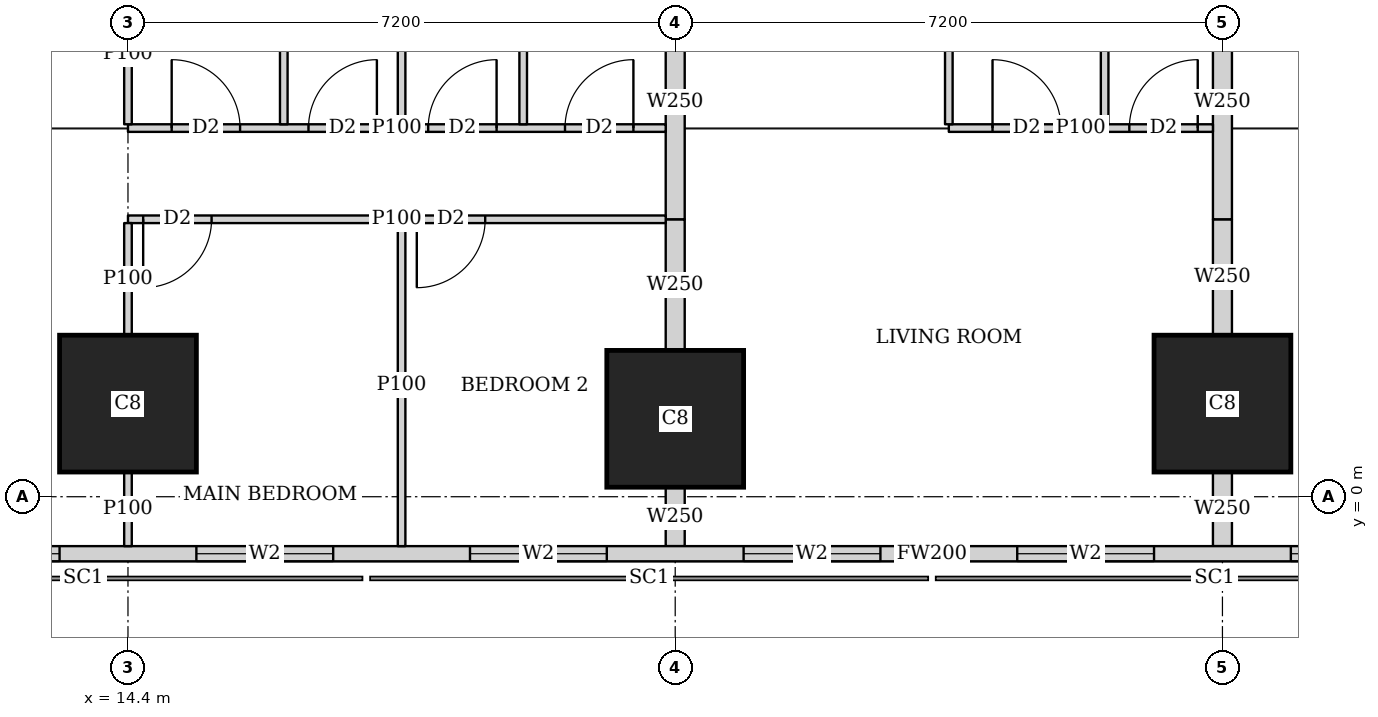
"""IFC4 building model, lengths in metres.
Left out: names, types, materials, properties, quantities, classifications, styles, units other than length and angle.
Written with IfcOpenShell. Run it as: python <this file> out.ifc"""

import sys

from ifc_helpers import new_model, si_unit, direction, frame, frame_2d, origin, origin_2d, place, context, subcontext, project, spatial, rectangle, extrude, element, fill, save


model = new_model("IFC4")
c1 = context("Model", 3, precision=1e-05, world=origin(), true_north=direction((0.0, 1.0)))
c2 = subcontext(c1, "Body", "Model", "MODEL_VIEW")
j1 = project(units=[si_unit("LENGTHUNIT", "METRE"), si_unit("PLANEANGLEUNIT", "RADIAN")], contexts=[c1])
p1 = place(None, origin())
s1 = spatial("IfcSite", under=j1, at=p1, CompositionType="ELEMENT")
p2 = place(p1, origin())
s2 = spatial("IfcBuilding", under=s1, at=p2, CompositionType="ELEMENT")
p3 = place(p2, frame((0.0, 0.0, 180.8)))
s3 = spatial("IfcBuildingStorey", under=s2, at=p3, CompositionType="ELEMENT", Elevation=180.8)
for number, where, z_axis, x_axis in (
    (1, (14.4, 1.225, 0.0), (0.0, 0.0, 1.0), (1.0, 0.0, 0.0)),
    (2, (21.6, 1.025, 0.0), (0.0, 0.0, 1.0), (1.0, 0.0, 0.0)),
    (3, (28.8, 1.225, 0.0), (0.0, 0.0, 1.0), (1.0, 0.0, 0.0)),
):
    element("IfcColumn", number, at=place(p3, frame(where, z_axis=z_axis, x_axis=x_axis)), inside=s3, PredefinedType="COLUMN", context=c2, shape_type="SweptSolid", body=[
        extrude(rectangle(XDim=1.8, YDim=1.8, at=origin_2d()), origin(), (0.0, 0.0, 1.0), 3.75),
    ])
p4 = place(p3, frame((2.163, -0.75, 0.0), z_axis=(0.0, 0.0, 1.0), x_axis=(1.0, 0.0, 0.0)))
e4 = element("IfcWall", 4, at=p4, inside=s3, PredefinedType="SOLIDWALL", context=c2, shape_type="SweptSolid", body=[
    extrude(rectangle(XDim=45.628, YDim=0.2, at=frame_2d((22.814, 0.0))), origin(), (0.0, 0.0, 1.0), 3.5),
])
p5 = place(p4, frame((9.537, 0.0, 0.9)))
e5 = element("IfcOpeningElement", 5, at=p5, cuts=e4, PredefinedType="OPENING", context=c2, shape_type="SweptSolid", body=[
    extrude(rectangle(XDim=1.8, YDim=1.5, at=frame_2d((0.9, 0.75))), frame((0.0, 0.11, 0.0), z_axis=(0.0, -1.0, 0.0), x_axis=(1.0, 0.0, 0.0)), (0.0, 0.0, 1.0), 0.22),
])
p6 = place(p4, frame((13.137, 0.0, 0.9)))
e6 = element("IfcOpeningElement", 6, at=p6, cuts=e4, PredefinedType="OPENING", context=c2, shape_type="SweptSolid", body=[
    extrude(rectangle(XDim=1.8, YDim=1.5, at=frame_2d((0.9, 0.75))), frame((0.0, 0.11, 0.0), z_axis=(0.0, -1.0, 0.0), x_axis=(1.0, 0.0, 0.0)), (0.0, 0.0, 1.0), 0.22),
])
p7 = place(p4, frame((16.737, 0.0, 0.9)))
e7 = element("IfcOpeningElement", 7, at=p7, cuts=e4, PredefinedType="OPENING", context=c2, shape_type="SweptSolid", body=[
    extrude(rectangle(XDim=1.8, YDim=1.5, at=frame_2d((0.9, 0.75))), frame((0.0, 0.11, 0.0), z_axis=(0.0, -1.0, 0.0), x_axis=(1.0, 0.0, 0.0)), (0.0, 0.0, 1.0), 0.22),
])
p8 = place(p4, frame((20.337, 0.0, 0.9)))
e8 = element("IfcOpeningElement", 8, at=p8, cuts=e4, PredefinedType="OPENING", context=c2, shape_type="SweptSolid", body=[
    extrude(rectangle(XDim=1.8, YDim=1.5, at=frame_2d((0.9, 0.75))), frame((0.0, 0.11, 0.0), z_axis=(0.0, -1.0, 0.0), x_axis=(1.0, 0.0, 0.0)), (0.0, 0.0, 1.0), 0.22),
])
p9 = place(p4, frame((23.937, 0.0, 0.9)))
e9 = element("IfcOpeningElement", 9, at=p9, cuts=e4, PredefinedType="OPENING", context=c2, shape_type="SweptSolid", body=[
    extrude(rectangle(XDim=1.8, YDim=1.5, at=frame_2d((0.9, 0.75))), frame((0.0, 0.11, 0.0), z_axis=(0.0, -1.0, 0.0), x_axis=(1.0, 0.0, 0.0)), (0.0, 0.0, 1.0), 0.22),
])
p10 = place(p4, frame((27.537, 0.0, 0.9)))
e10 = element("IfcOpeningElement", 10, at=p10, cuts=e4, PredefinedType="OPENING", context=c2, shape_type="SweptSolid", body=[
    extrude(rectangle(XDim=1.8, YDim=1.5, at=frame_2d((0.9, 0.75))), frame((0.0, 0.11, 0.0), z_axis=(0.0, -1.0, 0.0), x_axis=(1.0, 0.0, 0.0)), (0.0, 0.0, 1.0), 0.22),
])
p11 = place(p4, frame((31.137, 0.0, 0.9)))
e11 = element("IfcOpeningElement", 11, at=p11, cuts=e4, PredefinedType="OPENING", context=c2, shape_type="SweptSolid", body=[
    extrude(rectangle(XDim=1.8, YDim=1.5, at=frame_2d((0.9, 0.75))), frame((0.0, 0.11, 0.0), z_axis=(0.0, -1.0, 0.0), x_axis=(1.0, 0.0, 0.0)), (0.0, 0.0, 1.0), 0.22),
])
p12 = place(p4, frame((34.737, 0.0, 0.9)))
e12 = element("IfcOpeningElement", 12, at=p12, cuts=e4, PredefinedType="OPENING", context=c2, shape_type="SweptSolid", body=[
    extrude(rectangle(XDim=1.8, YDim=1.5, at=frame_2d((0.9, 0.75))), frame((0.0, 0.11, 0.0), z_axis=(0.0, -1.0, 0.0), x_axis=(1.0, 0.0, 0.0)), (0.0, 0.0, 1.0), 0.22),
])
p13 = place(p3, frame((21.475, 3.65, 0.0), z_axis=(0.0, 0.0, 1.0), x_axis=(-1.0, 0.0, 0.0)))
e13 = element("IfcWall", 13, at=p13, inside=s3, PredefinedType="PARTITIONING", context=c2, shape_type="SweptSolid", body=[
    extrude(rectangle(XDim=7.075, YDim=0.1, at=frame_2d((3.538, 0.0))), origin(), (0.0, 0.0, 1.0), 3.5),
])
p14 = place(p13, frame((5.975, 0.0, 0.0)))
e14 = element("IfcOpeningElement", 14, at=p14, cuts=e13, PredefinedType="OPENING", context=c2, shape_type="SweptSolid", body=[
    extrude(rectangle(XDim=0.9, YDim=2.1, at=frame_2d((0.45, 1.05))), frame((0.0, 0.06, 0.0), z_axis=(0.0, -1.0, 0.0), x_axis=(1.0, 0.0, 0.0)), (0.0, 0.0, 1.0), 0.12),
])
p15 = place(p13, frame((2.375, 0.0, 0.0)))
e15 = element("IfcOpeningElement", 15, at=p15, cuts=e13, PredefinedType="OPENING", context=c2, shape_type="SweptSolid", body=[
    extrude(rectangle(XDim=0.9, YDim=2.1, at=frame_2d((0.45, 1.05))), frame((0.0, 0.06, 0.0), z_axis=(0.0, -1.0, 0.0), x_axis=(1.0, 0.0, 0.0)), (0.0, 0.0, 1.0), 0.12),
])
p16 = place(p3, frame((21.475, 4.85, 0.0), z_axis=(0.0, 0.0, 1.0), x_axis=(-1.0, 0.0, 0.0)))
e16 = element("IfcWall", 16, at=p16, inside=s3, PredefinedType="PARTITIONING", context=c2, shape_type="SweptSolid", body=[
    extrude(rectangle(XDim=7.075, YDim=0.1, at=frame_2d((3.538, 0.0))), origin(), (0.0, 0.0, 1.0), 3.5),
])
p17 = place(p16, frame((5.6, 0.0, 0.0)))
e17 = element("IfcOpeningElement", 17, at=p17, cuts=e16, PredefinedType="OPENING", context=c2, shape_type="SweptSolid", body=[
    extrude(rectangle(XDim=0.9, YDim=2.1, at=frame_2d((0.45, 1.05))), frame((0.0, 0.06, 0.0), z_axis=(0.0, -1.0, 0.0), x_axis=(1.0, 0.0, 0.0)), (0.0, 0.0, 1.0), 0.12),
])
p18 = place(p16, frame((2.225, 0.0, 0.0)))
e18 = element("IfcOpeningElement", 18, at=p18, cuts=e16, PredefinedType="OPENING", context=c2, shape_type="SweptSolid", body=[
    extrude(rectangle(XDim=0.9, YDim=2.1, at=frame_2d((0.45, 1.05))), frame((0.0, 0.06, 0.0), z_axis=(0.0, -1.0, 0.0), x_axis=(1.0, 0.0, 0.0)), (0.0, 0.0, 1.0), 0.12),
])
p19 = place(p16, frame((3.8, 0.0, 0.0)))
e19 = element("IfcOpeningElement", 19, at=p19, cuts=e16, PredefinedType="OPENING", context=c2, shape_type="SweptSolid", body=[
    extrude(rectangle(XDim=0.9, YDim=2.1, at=frame_2d((0.45, 1.05))), frame((0.0, 0.06, 0.0), z_axis=(0.0, -1.0, 0.0), x_axis=(1.0, 0.0, 0.0)), (0.0, 0.0, 1.0), 0.12),
])
p20 = place(p16, frame((0.425, 0.0, 0.0)))
e20 = element("IfcOpeningElement", 20, at=p20, cuts=e16, PredefinedType="OPENING", context=c2, shape_type="SweptSolid", body=[
    extrude(rectangle(XDim=0.9, YDim=2.1, at=frame_2d((0.45, 1.05))), frame((0.0, 0.06, 0.0), z_axis=(0.0, -1.0, 0.0), x_axis=(1.0, 0.0, 0.0)), (0.0, 0.0, 1.0), 0.12),
])
p21 = place(p3, frame((14.4, -0.65, 0.0), z_axis=(0.0, 0.0, 1.0), x_axis=(0.0, 1.0, 0.0)))
e21 = element("IfcWall", 21, at=p21, inside=s3, PredefinedType="PARTITIONING", context=c2, shape_type="SweptSolid", body=[
    extrude(rectangle(XDim=0.974, YDim=0.1, at=frame_2d((0.487, 0.0))), origin(), (0.0, 0.0, 1.0), 3.5),
])
p22 = place(p3, frame((14.4, 2.126, 0.0), z_axis=(0.0, 0.0, 1.0), x_axis=(0.0, 1.0, 0.0)))
e22 = element("IfcWall", 22, at=p22, inside=s3, PredefinedType="PARTITIONING", context=c2, shape_type="SweptSolid", body=[
    extrude(rectangle(XDim=1.474, YDim=0.1, at=frame_2d((0.737, 0.0))), origin(), (0.0, 0.0, 1.0), 3.5),
])
p23 = place(p3, frame((18.0, -0.65, 0.0), z_axis=(0.0, 0.0, 1.0), x_axis=(0.0, 1.0, 0.0)))
e23 = element("IfcWall", 23, at=p23, inside=s3, PredefinedType="PARTITIONING", context=c2, shape_type="SweptSolid", body=[
    extrude(rectangle(XDim=4.25, YDim=0.1, at=frame_2d((2.125, 0.0))), origin(), (0.0, 0.0, 1.0), 2.1),
])
p24 = place(p3, frame((14.4, 4.9, 0.0), z_axis=(0.0, 0.0, 1.0), x_axis=(0.0, 1.0, 0.0)))
e24 = element("IfcWall", 24, at=p24, inside=s3, PredefinedType="PARTITIONING", context=c2, shape_type="SweptSolid", body=[
    extrude(rectangle(XDim=1.849, YDim=0.1, at=frame_2d((0.925, 0.0))), origin(), (0.0, 0.0, 1.0), 3.5),
])
for number, where, z_axis, x_axis in (
    (25, (18.0, 4.9, 0.0), (0.0, 0.0, 1.0), (0.0, 1.0, 0.0)),
    (26, (16.45, 4.9, 0.0), (0.0, 0.0, 1.0), (0.0, 1.0, 0.0)),
    (27, (19.6, 4.9, 0.0), (0.0, 0.0, 1.0), (0.0, 1.0, 0.0)),
):
    element("IfcWall", number, at=place(p3, frame(where, z_axis=z_axis, x_axis=x_axis)), inside=s3, PredefinedType="PARTITIONING", context=c2, shape_type="SweptSolid", body=[
        extrude(rectangle(XDim=3.525, YDim=0.1, at=frame_2d((1.763, 0.0))), origin(), (0.0, 0.0, 1.0), 3.5),
    ])
p25 = place(p3, frame((28.675, 4.85, 0.0), z_axis=(0.0, 0.0, 1.0), x_axis=(-1.0, 0.0, 0.0)))
e28 = element("IfcWall", 28, at=p25, inside=s3, PredefinedType="PARTITIONING", context=c2, shape_type="SweptSolid", body=[
    extrude(rectangle(XDim=3.475, YDim=0.1, at=frame_2d((1.738, 0.0))), origin(), (0.0, 0.0, 1.0), 3.5),
])
p26 = place(p25, frame((2.0, 0.0, 0.0)))
e29 = element("IfcOpeningElement", 29, at=p26, cuts=e28, PredefinedType="OPENING", context=c2, shape_type="SweptSolid", body=[
    extrude(rectangle(XDim=0.9, YDim=2.1, at=frame_2d((0.45, 1.05))), frame((0.0, 0.06, 0.0), z_axis=(0.0, -1.0, 0.0), x_axis=(1.0, 0.0, 0.0)), (0.0, 0.0, 1.0), 0.12),
])
p27 = place(p25, frame((0.2, 0.0, 0.0)))
e30 = element("IfcOpeningElement", 30, at=p27, cuts=e28, PredefinedType="OPENING", context=c2, shape_type="SweptSolid", body=[
    extrude(rectangle(XDim=0.9, YDim=2.1, at=frame_2d((0.45, 1.05))), frame((0.0, 0.06, 0.0), z_axis=(0.0, -1.0, 0.0), x_axis=(1.0, 0.0, 0.0)), (0.0, 0.0, 1.0), 0.12),
])
for number, where, z_axis, x_axis in (
    (31, (25.2, 4.9, 0.0), (0.0, 0.0, 1.0), (0.0, 1.0, 0.0)),
    (32, (27.25, 4.9, 0.0), (0.0, 0.0, 1.0), (0.0, 1.0, 0.0)),
):
    element("IfcWall", number, at=place(p3, frame(where, z_axis=z_axis, x_axis=x_axis)), inside=s3, PredefinedType="PARTITIONING", context=c2, shape_type="SweptSolid", body=[
        extrude(rectangle(XDim=3.525, YDim=0.1, at=frame_2d((1.763, 0.0))), origin(), (0.0, 0.0, 1.0), 3.5),
    ])
p28 = place(p3, frame((21.6, -0.65, 0.0), z_axis=(0.0, 0.0, 1.0), x_axis=(0.0, 1.0, 0.0)))
e33 = element("IfcWall", 33, at=p28, inside=s3, PredefinedType="SOLIDWALL", context=c2, shape_type="SweptSolid", body=[
    extrude(rectangle(XDim=0.774, YDim=0.25, at=frame_2d((0.387, 0.0))), origin(), (0.0, 0.0, 1.0), 2.1),
])
p29 = place(p3, frame((21.6, 1.926, 0.0), z_axis=(0.0, 0.0, 1.0), x_axis=(0.0, 1.0, 0.0)))
e34 = element("IfcWall", 34, at=p29, inside=s3, PredefinedType="SOLIDWALL", context=c2, shape_type="SweptSolid", body=[
    extrude(rectangle(XDim=1.724, YDim=0.25, at=frame_2d((0.862, 0.0))), origin(), (0.0, 0.0, 1.0), 2.1),
])
p30 = place(p3, frame((21.6, 3.65, 0.0), z_axis=(0.0, 0.0, 1.0), x_axis=(0.0, 1.0, 0.0)))
e35 = element("IfcWall", 35, at=p30, inside=s3, PredefinedType="SOLIDWALL", context=c2, shape_type="SweptSolid", body=[
    extrude(rectangle(XDim=3.099, YDim=0.25, at=frame_2d((1.55, 0.0))), origin(), (0.0, 0.0, 1.0), 3.5),
])
p31 = place(p3, frame((28.8, -0.65, 0.0), z_axis=(0.0, 0.0, 1.0), x_axis=(0.0, 1.0, 0.0)))
e36 = element("IfcWall", 36, at=p31, inside=s3, PredefinedType="SOLIDWALL", context=c2, shape_type="SweptSolid", body=[
    extrude(rectangle(XDim=0.974, YDim=0.25, at=frame_2d((0.487, 0.0))), origin(), (0.0, 0.0, 1.0), 2.1),
])
p32 = place(p3, frame((28.8, 2.126, 0.0), z_axis=(0.0, 0.0, 1.0), x_axis=(0.0, 1.0, 0.0)))
e37 = element("IfcWall", 37, at=p32, inside=s3, PredefinedType="SOLIDWALL", context=c2, shape_type="SweptSolid", body=[
    extrude(rectangle(XDim=1.524, YDim=0.25, at=frame_2d((0.762, 0.0))), origin(), (0.0, 0.0, 1.0), 2.1),
])
p33 = place(p3, frame((28.8, 3.65, 0.0), z_axis=(0.0, 0.0, 1.0), x_axis=(0.0, 1.0, 0.0)))
e38 = element("IfcWall", 38, at=p33, inside=s3, PredefinedType="SOLIDWALL", context=c2, shape_type="SweptSolid", body=[
    extrude(rectangle(XDim=3.099, YDim=0.25, at=frame_2d((1.55, 0.0))), origin(), (0.0, 0.0, 1.0), 3.5),
])
p34 = place(p5, origin())
e39 = element("IfcWindow", 39, at=p34, inside=s3, PartitioningType="SINGLE_PANEL", PredefinedType="WINDOW", context=c2, shape_type="SweptSolid", body=[
    extrude(rectangle(XDim=1.8, YDim=1.5, at=frame_2d((0.9, 0.75))), frame((0.0, 0.03, 0.0), z_axis=(0.0, -1.0, 0.0), x_axis=(1.0, 0.0, 0.0)), (0.0, 0.0, 1.0), 0.06),
])
fill(e5, e39)
p35 = place(p6, origin())
e40 = element("IfcWindow", 40, at=p35, inside=s3, PartitioningType="SINGLE_PANEL", PredefinedType="WINDOW", context=c2, shape_type="SweptSolid", body=[
    extrude(rectangle(XDim=1.8, YDim=1.5, at=frame_2d((0.9, 0.75))), frame((0.0, 0.03, 0.0), z_axis=(0.0, -1.0, 0.0), x_axis=(1.0, 0.0, 0.0)), (0.0, 0.0, 1.0), 0.06),
])
fill(e6, e40)
p36 = place(p7, origin())
e41 = element("IfcWindow", 41, at=p36, inside=s3, PartitioningType="SINGLE_PANEL", PredefinedType="WINDOW", context=c2, shape_type="SweptSolid", body=[
    extrude(rectangle(XDim=1.8, YDim=1.5, at=frame_2d((0.9, 0.75))), frame((0.0, 0.03, 0.0), z_axis=(0.0, -1.0, 0.0), x_axis=(1.0, 0.0, 0.0)), (0.0, 0.0, 1.0), 0.06),
])
fill(e7, e41)
p37 = place(p8, origin())
e42 = element("IfcWindow", 42, at=p37, inside=s3, PartitioningType="SINGLE_PANEL", PredefinedType="WINDOW", context=c2, shape_type="SweptSolid", body=[
    extrude(rectangle(XDim=1.8, YDim=1.5, at=frame_2d((0.9, 0.75))), frame((0.0, 0.03, 0.0), z_axis=(0.0, -1.0, 0.0), x_axis=(1.0, 0.0, 0.0)), (0.0, 0.0, 1.0), 0.06),
])
fill(e8, e42)
p38 = place(p9, origin())
e43 = element("IfcWindow", 43, at=p38, inside=s3, PartitioningType="SINGLE_PANEL", PredefinedType="WINDOW", context=c2, shape_type="SweptSolid", body=[
    extrude(rectangle(XDim=1.8, YDim=1.5, at=frame_2d((0.9, 0.75))), frame((0.0, 0.03, 0.0), z_axis=(0.0, -1.0, 0.0), x_axis=(1.0, 0.0, 0.0)), (0.0, 0.0, 1.0), 0.06),
])
fill(e9, e43)
p39 = place(p10, origin())
e44 = element("IfcWindow", 44, at=p39, inside=s3, PartitioningType="SINGLE_PANEL", PredefinedType="WINDOW", context=c2, shape_type="SweptSolid", body=[
    extrude(rectangle(XDim=1.8, YDim=1.5, at=frame_2d((0.9, 0.75))), frame((0.0, 0.03, 0.0), z_axis=(0.0, -1.0, 0.0), x_axis=(1.0, 0.0, 0.0)), (0.0, 0.0, 1.0), 0.06),
])
fill(e10, e44)
p40 = place(p14, origin())
e45 = element("IfcDoor", 45, at=p40, inside=s3, OperationType="SINGLE_SWING_RIGHT", PredefinedType="DOOR", context=c2, shape_type="SweptSolid", body=[
    extrude(rectangle(XDim=0.9, YDim=2.1, at=frame_2d((0.45, 1.05))), frame((0.0, 0.025, 0.0), z_axis=(0.0, -1.0, 0.0), x_axis=(1.0, 0.0, 0.0)), (0.0, 0.0, 1.0), 0.05),
])
fill(e14, e45)
p41 = place(p15, origin())
e46 = element("IfcDoor", 46, at=p41, inside=s3, OperationType="SINGLE_SWING_RIGHT", PredefinedType="DOOR", context=c2, shape_type="SweptSolid", body=[
    extrude(rectangle(XDim=0.9, YDim=2.1, at=frame_2d((0.45, 1.05))), frame((0.0, 0.025, 0.0), z_axis=(0.0, -1.0, 0.0), x_axis=(1.0, 0.0, 0.0)), (0.0, 0.0, 1.0), 0.05),
])
fill(e15, e46)
p42 = place(p17, origin())
e47 = element("IfcDoor", 47, at=p42, inside=s3, OperationType="SINGLE_SWING_LEFT", PredefinedType="DOOR", context=c2, shape_type="SweptSolid", body=[
    extrude(rectangle(XDim=0.9, YDim=2.1, at=frame_2d((0.45, 1.05))), frame((0.0, 0.025, 0.0), z_axis=(0.0, -1.0, 0.0), x_axis=(1.0, 0.0, 0.0)), (0.0, 0.0, 1.0), 0.05),
])
fill(e17, e47)
p43 = place(p18, origin())
e48 = element("IfcDoor", 48, at=p43, inside=s3, OperationType="SINGLE_SWING_RIGHT", PredefinedType="DOOR", context=c2, shape_type="SweptSolid", body=[
    extrude(rectangle(XDim=0.9, YDim=2.1, at=frame_2d((0.45, 1.05))), frame((0.0, 0.025, 0.0), z_axis=(0.0, -1.0, 0.0), x_axis=(1.0, 0.0, 0.0)), (0.0, 0.0, 1.0), 0.05),
])
fill(e18, e48)
p44 = place(p19, origin())
e49 = element("IfcDoor", 49, at=p44, inside=s3, OperationType="SINGLE_SWING_RIGHT", PredefinedType="DOOR", context=c2, shape_type="SweptSolid", body=[
    extrude(rectangle(XDim=0.9, YDim=2.1, at=frame_2d((0.45, 1.05))), frame((0.0, 0.025, 0.0), z_axis=(0.0, -1.0, 0.0), x_axis=(1.0, 0.0, 0.0)), (0.0, 0.0, 1.0), 0.05),
])
fill(e19, e49)
p45 = place(p20, origin())
e50 = element("IfcDoor", 50, at=p45, inside=s3, OperationType="SINGLE_SWING_RIGHT", PredefinedType="DOOR", context=c2, shape_type="SweptSolid", body=[
    extrude(rectangle(XDim=0.9, YDim=2.1, at=frame_2d((0.45, 1.05))), frame((0.0, 0.025, 0.0), z_axis=(0.0, -1.0, 0.0), x_axis=(1.0, 0.0, 0.0)), (0.0, 0.0, 1.0), 0.05),
])
fill(e20, e50)
p46 = place(p26, origin())
e51 = element("IfcDoor", 51, at=p46, inside=s3, OperationType="SINGLE_SWING_LEFT", PredefinedType="DOOR", context=c2, shape_type="SweptSolid", body=[
    extrude(rectangle(XDim=0.9, YDim=2.1, at=frame_2d((0.45, 1.05))), frame((0.0, 0.025, 0.0), z_axis=(0.0, -1.0, 0.0), x_axis=(1.0, 0.0, 0.0)), (0.0, 0.0, 1.0), 0.05),
])
fill(e29, e51)
p47 = place(p27, origin())
e52 = element("IfcDoor", 52, at=p47, inside=s3, OperationType="SINGLE_SWING_RIGHT", PredefinedType="DOOR", context=c2, shape_type="SweptSolid", body=[
    extrude(rectangle(XDim=0.9, YDim=2.1, at=frame_2d((0.45, 1.05))), frame((0.0, 0.025, 0.0), z_axis=(0.0, -1.0, 0.0), x_axis=(1.0, 0.0, 0.0)), (0.0, 0.0, 1.0), 0.05),
])
fill(e30, e52)
save(model, sys.argv[1])
